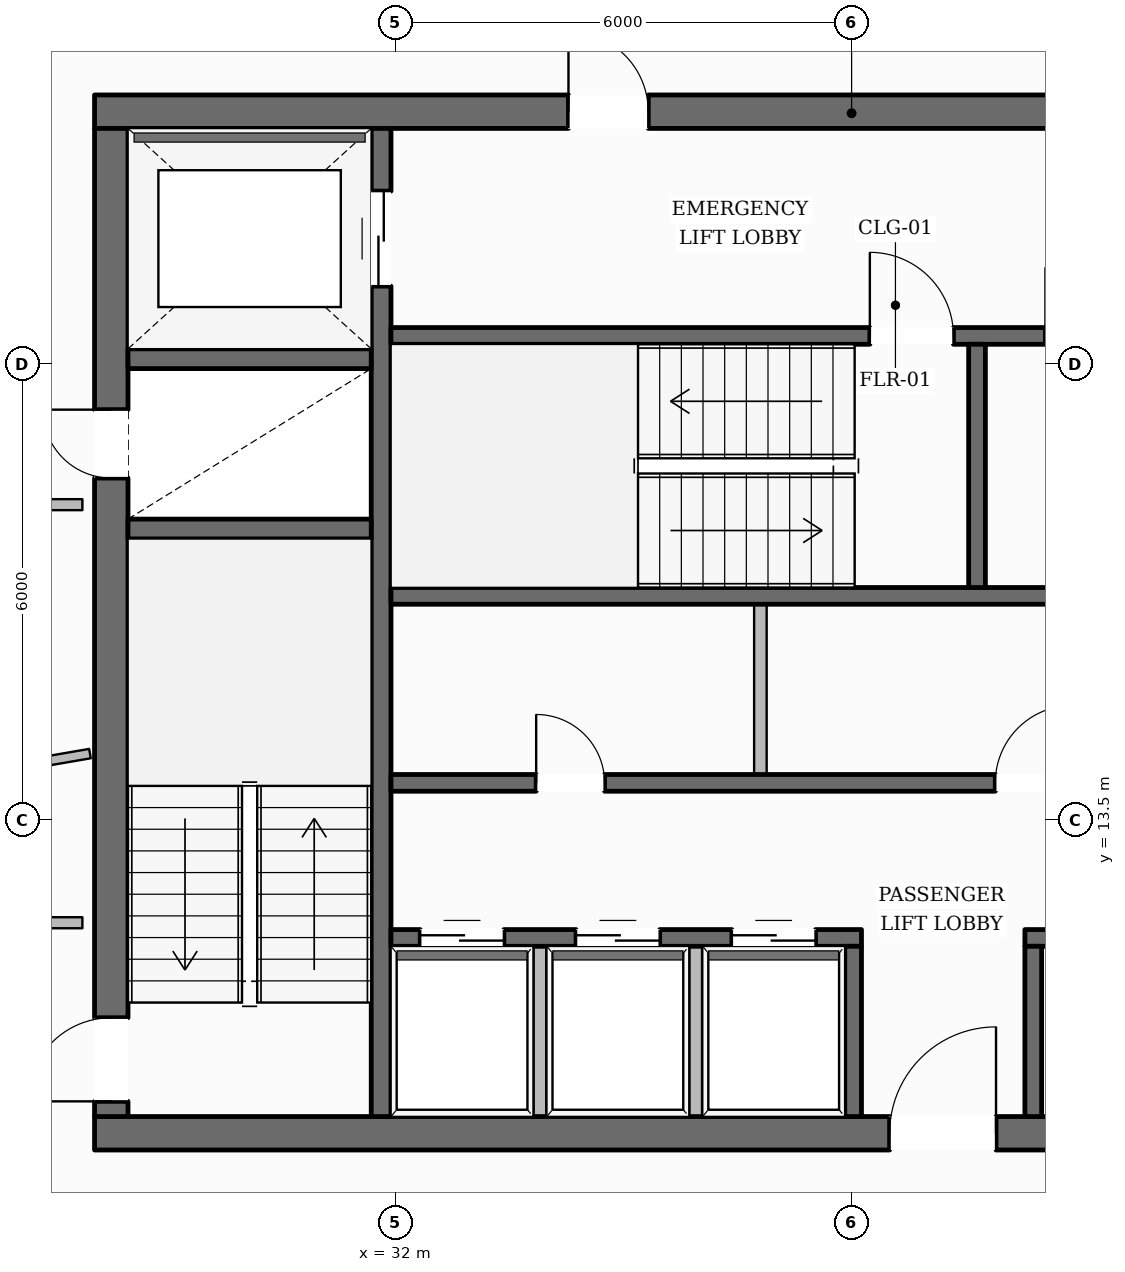
"""IFC4 building model, lengths in metres.
Left out: names, types, materials, properties, quantities, classifications, styles, units other than length and angle.
Written with IfcOpenShell. Run it as: python <this file> out.ifc"""

import sys

from ifc_helpers import new_model, si_unit, direction, frame, frame_2d, origin, place, context, subcontext, project, spatial, rectangle, extrude, element, fill, save


model = new_model("IFC4")
c1 = context("Model", 3, precision=1e-05, world=origin(), true_north=direction((0.0, 1.0)))
c2 = subcontext(c1, "Body", "Model", "MODEL_VIEW")
j1 = project(units=[si_unit("LENGTHUNIT", "METRE"), si_unit("PLANEANGLEUNIT", "RADIAN")], contexts=[c1])
p1 = place(None, origin())
s1 = spatial("IfcSite", under=j1, at=p1, CompositionType="ELEMENT")
p2 = place(p1, origin())
s2 = spatial("IfcBuilding", under=s1, at=p2, CompositionType="ELEMENT")
p3 = place(p2, frame((0.0, 0.0, 180.4)))
s3 = spatial("IfcBuildingStorey", under=s2, at=p3, CompositionType="ELEMENT", Elevation=180.4)
p4 = place(p3, frame((28.04, 9.38, 0.0), z_axis=(0.0, 0.0, 1.0), x_axis=(1.0, 0.0, 0.0)))
e1 = element("IfcWall", 1, at=p4, inside=s3, PredefinedType="SOLIDWALL", context=c2, shape_type="SweptSolid", body=[
    extrude(rectangle(XDim=19.92, YDim=0.44, at=frame_2d((9.96, 0.0))), origin(), (0.0, 0.0, 1.0), 3.6),
])
p5 = place(p4, frame((10.46, 0.0, 0.0)))
e2 = element("IfcOpeningElement", 2, at=p5, cuts=e1, PredefinedType="OPENING", context=c2, shape_type="SweptSolid", body=[
    extrude(rectangle(XDim=1.4, YDim=2.2, at=frame_2d((0.7, 1.1))), frame((0.0, 0.23, 0.0), z_axis=(0.0, -1.0, 0.0), x_axis=(1.0, 0.0, 0.0)), (0.0, 0.0, 1.0), 0.46),
])
p6 = place(p3, frame((28.04, 22.82, 0.0), z_axis=(0.0, 0.0, 1.0), x_axis=(1.0, 0.0, 0.0)))
e3 = element("IfcWall", 3, at=p6, inside=s3, PredefinedType="SOLIDWALL", context=c2, shape_type="SweptSolid", body=[
    extrude(rectangle(XDim=19.92, YDim=0.44, at=frame_2d((9.96, 0.0))), origin(), (0.0, 0.0, 1.0), 3.6),
])
p7 = place(p6, frame((6.235, 0.0, 0.0)))
e4 = element("IfcOpeningElement", 4, at=p7, cuts=e3, PredefinedType="OPENING", context=c2, shape_type="SweptSolid", body=[
    extrude(rectangle(XDim=1.05, YDim=2.15, at=frame_2d((0.525, 1.075))), frame((0.0, 0.23, 0.0), z_axis=(0.0, -1.0, 0.0), x_axis=(1.0, 0.0, 0.0)), (0.0, 0.0, 1.0), 0.46),
])
p8 = place(p6, frame((12.635, 0.0, 0.0)))
e5 = element("IfcOpeningElement", 5, at=p8, cuts=e3, PredefinedType="OPENING", context=c2, shape_type="SweptSolid", body=[
    extrude(rectangle(XDim=1.05, YDim=2.15, at=frame_2d((0.525, 1.075))), frame((0.0, 0.23, 0.0), z_axis=(0.0, -1.0, 0.0), x_axis=(1.0, 0.0, 0.0)), (0.0, 0.0, 1.0), 0.46),
])
p9 = place(p3, frame((28.26, 9.6, 0.0), z_axis=(0.0, 0.0, 1.0), x_axis=(0.0, 1.0, 0.0)))
e6 = element("IfcWall", 6, at=p9, inside=s3, PredefinedType="SOLIDWALL", context=c2, shape_type="SweptSolid", body=[
    extrude(rectangle(XDim=13.0, YDim=0.44, at=frame_2d((6.5, 0.0))), origin(), (0.0, 0.0, 1.0), 3.6),
])
p10 = place(p9, frame((0.2, 0.0, 0.0)))
e7 = element("IfcOpeningElement", 7, at=p10, cuts=e6, PredefinedType="OPENING", context=c2, shape_type="SweptSolid", body=[
    extrude(rectangle(XDim=1.1, YDim=2.15, at=frame_2d((0.55, 1.075))), frame((0.0, 0.23, 0.0), z_axis=(0.0, -1.0, 0.0), x_axis=(1.0, 0.0, 0.0)), (0.0, 0.0, 1.0), 0.46),
])
p11 = place(p9, frame((8.4, 0.0, 0.0)))
e8 = element("IfcOpeningElement", 8, at=p11, cuts=e6, PredefinedType="OPENING", context=c2, shape_type="SweptSolid", body=[
    extrude(rectangle(XDim=0.9, YDim=2.1, at=frame_2d((0.45, 1.05))), frame((0.0, 0.23, 0.0), z_axis=(0.0, -1.0, 0.0), x_axis=(1.0, 0.0, 0.0)), (0.0, 0.0, 1.0), 0.46),
])
p12 = place(p3, frame((31.81, 9.6, 0.0), z_axis=(0.0, 0.0, 1.0), x_axis=(0.0, 1.0, 0.0)))
e9 = element("IfcWall", 9, at=p12, inside=s3, PredefinedType="SHEAR", context=c2, shape_type="SweptSolid", body=[
    extrude(rectangle(XDim=13.0, YDim=0.26, at=frame_2d((6.5, 0.0))), origin(), (0.0, 0.0, 1.0), 3.6),
])
p13 = place(p12, frame((10.925, 0.0, 0.0)))
e10 = element("IfcOpeningElement", 10, at=p13, cuts=e9, PredefinedType="OPENING", context=c2, shape_type="SweptSolid", body=[
    extrude(rectangle(XDim=1.25, YDim=2.25, at=frame_2d((0.625, 1.125))), frame((0.0, 0.14, 0.0), z_axis=(0.0, -1.0, 0.0), x_axis=(1.0, 0.0, 0.0)), (0.0, 0.0, 1.0), 0.28),
])
for number, where, z_axis, x_axis in (
    (11, (28.48, 17.33, 0.0), (0.0, 0.0, 1.0), (1.0, 0.0, 0.0)),
    (12, (28.48, 19.57, 0.0), (0.0, 0.0, 1.0), (1.0, 0.0, 0.0)),
):
    element("IfcWall", number, at=place(p3, frame(where, z_axis=z_axis, x_axis=x_axis)), inside=s3, PredefinedType="SHEAR", context=c2, shape_type="SweptSolid", body=[
        extrude(rectangle(XDim=3.2, YDim=0.26, at=frame_2d((1.6, 0.0))), origin(), (0.0, 0.0, 1.0), 3.6),
    ])
p14 = place(p3, frame((31.94, 19.87, 0.0), z_axis=(0.0, 0.0, 1.0), x_axis=(1.0, 0.0, 0.0)))
e13 = element("IfcWall", 13, at=p14, inside=s3, PredefinedType="SOLIDWALL", context=c2, shape_type="SweptSolid", body=[
    extrude(rectangle(XDim=12.12, YDim=0.22, at=frame_2d((6.06, 0.0))), origin(), (0.0, 0.0, 1.0), 3.6),
])
p15 = place(p14, frame((6.3, 0.0, 0.0)))
e14 = element("IfcOpeningElement", 14, at=p15, cuts=e13, PredefinedType="OPENING", context=c2, shape_type="SweptSolid", body=[
    extrude(rectangle(XDim=1.1, YDim=2.15, at=frame_2d((0.55, 1.075))), frame((0.0, 0.12, 0.0), z_axis=(0.0, -1.0, 0.0), x_axis=(1.0, 0.0, 0.0)), (0.0, 0.0, 1.0), 0.24),
])
p16 = place(p14, frame((8.61, 0.0, 0.0)))
e15 = element("IfcOpeningElement", 15, at=p16, cuts=e13, PredefinedType="OPENING", context=c2, shape_type="SweptSolid", body=[
    extrude(rectangle(XDim=0.9, YDim=2.1, at=frame_2d((0.45, 1.05))), frame((0.0, 0.12, 0.0), z_axis=(0.0, -1.0, 0.0), x_axis=(1.0, 0.0, 0.0)), (0.0, 0.0, 1.0), 0.24),
])
p17 = place(p14, frame((10.85, 0.0, 0.0)))
e16 = element("IfcOpeningElement", 16, at=p17, cuts=e13, PredefinedType="OPENING", context=c2, shape_type="SweptSolid", body=[
    extrude(rectangle(XDim=0.9, YDim=2.1, at=frame_2d((0.45, 1.05))), frame((0.0, 0.12, 0.0), z_axis=(0.0, -1.0, 0.0), x_axis=(1.0, 0.0, 0.0)), (0.0, 0.0, 1.0), 0.24),
])
p18 = place(p3, frame((31.94, 16.45, 0.0), z_axis=(0.0, 0.0, 1.0), x_axis=(1.0, 0.0, 0.0)))
e17 = element("IfcWall", 17, at=p18, inside=s3, PredefinedType="SOLIDWALL", context=c2, shape_type="SweptSolid", body=[
    extrude(rectangle(XDim=12.12, YDim=0.22, at=frame_2d((6.06, 0.0))), origin(), (0.0, 0.0, 1.0), 3.6),
])
p19 = place(p3, frame((39.65, 16.56, 0.0), z_axis=(0.0, 0.0, 1.0), x_axis=(0.0, 1.0, 0.0)))
e18 = element("IfcWall", 18, at=p19, inside=s3, PredefinedType="SOLIDWALL", context=c2, shape_type="SweptSolid", body=[
    extrude(rectangle(XDim=3.2, YDim=0.22, at=frame_2d((1.6, 0.0))), origin(), (0.0, 0.0, 1.0), 3.6),
])
p20 = place(p3, frame((31.94, 13.99, 0.0), z_axis=(0.0, 0.0, 1.0), x_axis=(1.0, 0.0, 0.0)))
e19 = element("IfcWall", 19, at=p20, inside=s3, PredefinedType="SOLIDWALL", context=c2, shape_type="SweptSolid", body=[
    extrude(rectangle(XDim=12.12, YDim=0.22, at=frame_2d((6.06, 0.0))), origin(), (0.0, 0.0, 1.0), 3.6),
])
p21 = place(p20, frame((1.91, 0.0, 0.0)))
e20 = element("IfcOpeningElement", 20, at=p21, cuts=e19, PredefinedType="OPENING", context=c2, shape_type="SweptSolid", body=[
    extrude(rectangle(XDim=0.9, YDim=2.1, at=frame_2d((0.45, 1.05))), frame((0.0, 0.12, 0.0), z_axis=(0.0, -1.0, 0.0), x_axis=(1.0, 0.0, 0.0)), (0.0, 0.0, 1.0), 0.24),
])
p22 = place(p20, frame((7.95, 0.0, 0.0)))
e21 = element("IfcOpeningElement", 21, at=p22, cuts=e19, PredefinedType="OPENING", context=c2, shape_type="SweptSolid", body=[
    extrude(rectangle(XDim=1.02, YDim=2.15, at=frame_2d((0.51, 1.075))), frame((0.0, 0.12, 0.0), z_axis=(0.0, -1.0, 0.0), x_axis=(1.0, 0.0, 0.0)), (0.0, 0.0, 1.0), 0.24),
])
p23 = place(p3, frame((31.94, 11.95, 0.0), z_axis=(0.0, 0.0, 1.0), x_axis=(1.0, 0.0, 0.0)))
e22 = element("IfcWall", 22, at=p23, inside=s3, PredefinedType="SOLIDWALL", context=c2, shape_type="SweptSolid", body=[
    extrude(rectangle(XDim=6.19, YDim=0.22, at=frame_2d((3.095, 0.0))), origin(), (0.0, 0.0, 1.0), 3.6),
])
p24 = place(p23, frame((0.385, 0.0, 0.0)))
e23 = element("IfcOpeningElement", 23, at=p24, cuts=e22, PredefinedType="OPENING", context=c2, shape_type="SweptSolid", body=[
    extrude(rectangle(XDim=1.1, YDim=2.2, at=frame_2d((0.55, 1.1))), frame((0.0, 0.12, 0.0), z_axis=(0.0, -1.0, 0.0), x_axis=(1.0, 0.0, 0.0)), (0.0, 0.0, 1.0), 0.24),
])
p25 = place(p23, frame((2.435, 0.0, 0.0)))
e24 = element("IfcOpeningElement", 24, at=p25, cuts=e22, PredefinedType="OPENING", context=c2, shape_type="SweptSolid", body=[
    extrude(rectangle(XDim=1.1, YDim=2.2, at=frame_2d((0.55, 1.1))), frame((0.0, 0.12, 0.0), z_axis=(0.0, -1.0, 0.0), x_axis=(1.0, 0.0, 0.0)), (0.0, 0.0, 1.0), 0.24),
])
p26 = place(p23, frame((4.485, 0.0, 0.0)))
e25 = element("IfcOpeningElement", 25, at=p26, cuts=e22, PredefinedType="OPENING", context=c2, shape_type="SweptSolid", body=[
    extrude(rectangle(XDim=1.1, YDim=2.2, at=frame_2d((0.55, 1.1))), frame((0.0, 0.12, 0.0), z_axis=(0.0, -1.0, 0.0), x_axis=(1.0, 0.0, 0.0)), (0.0, 0.0, 1.0), 0.24),
])
p27 = place(p3, frame((40.28, 11.95, 0.0), z_axis=(0.0, 0.0, 1.0), x_axis=(1.0, 0.0, 0.0)))
e26 = element("IfcWall", 26, at=p27, inside=s3, PredefinedType="SOLIDWALL", context=c2, shape_type="SweptSolid", body=[
    extrude(rectangle(XDim=3.78, YDim=0.22, at=frame_2d((1.89, 0.0))), origin(), (0.0, 0.0, 1.0), 3.6),
])
p28 = place(p27, frame((1.55, 0.0, 0.0)))
e27 = element("IfcOpeningElement", 27, at=p28, cuts=e26, PredefinedType="OPENING", context=c2, shape_type="SweptSolid", body=[
    extrude(rectangle(XDim=0.9, YDim=2.1, at=frame_2d((0.45, 1.05))), frame((0.0, 0.12, 0.0), z_axis=(0.0, -1.0, 0.0), x_axis=(1.0, 0.0, 0.0)), (0.0, 0.0, 1.0), 0.24),
])
for number, where, z_axis, x_axis in (
    (28, (38.02, 9.6, 0.0), (0.0, 0.0, 1.0), (0.0, 1.0, 0.0)),
    (29, (40.39, 9.6, 0.0), (0.0, 0.0, 1.0), (0.0, 1.0, 0.0)),
):
    element("IfcWall", number, at=place(p3, frame(where, z_axis=z_axis, x_axis=x_axis)), inside=s3, PredefinedType="SOLIDWALL", context=c2, shape_type="SweptSolid", body=[
        extrude(rectangle(XDim=2.24, YDim=0.22, at=frame_2d((1.12, 0.0))), origin(), (0.0, 0.0, 1.0), 3.6),
    ])
p29 = place(p3, frame((15.064, 11.953, 0.0), z_axis=(0.0, 0.0, 1.0), x_axis=(0.495993114815, 0.86832645362, 0.0)))
e30 = element("IfcWall", 30, at=p29, inside=s3, PredefinedType="STANDARD", context=c2, shape_type="SweptSolid", body=[
    extrude(rectangle(XDim=37.324, YDim=0.35, at=frame_2d((18.662, 0.0))), origin(), (0.0, 0.0, 1.0), 3.132),
])
p30 = place(p29, frame((33.087, 0.0, 0.65)))
e31 = element("IfcOpeningElement", 31, at=p30, cuts=e30, PredefinedType="OPENING", context=c2, shape_type="SweptSolid", body=[
    extrude(rectangle(XDim=1.45, YDim=1.75, at=frame_2d((0.725, 0.875))), frame((0.0, 0.185, 0.0), z_axis=(0.0, -1.0, 0.0), x_axis=(1.0, 0.0, 0.0)), (0.0, 0.0, 1.0), 0.37),
])
p31 = place(p29, frame((27.026, 0.0, 0.65)))
e32 = element("IfcOpeningElement", 32, at=p31, cuts=e30, PredefinedType="OPENING", context=c2, shape_type="SweptSolid", body=[
    extrude(rectangle(XDim=1.45, YDim=1.75, at=frame_2d((0.725, 0.875))), frame((0.0, 0.185, 0.0), z_axis=(0.0, -1.0, 0.0), x_axis=(1.0, 0.0, 0.0)), (0.0, 0.0, 1.0), 0.37),
])
p32 = place(p29, frame((14.904, 0.0, 0.65)))
e33 = element("IfcOpeningElement", 33, at=p32, cuts=e30, PredefinedType="OPENING", context=c2, shape_type="SweptSolid", body=[
    extrude(rectangle(XDim=1.45, YDim=1.75, at=frame_2d((0.725, 0.875))), frame((0.0, 0.185, 0.0), z_axis=(0.0, -1.0, 0.0), x_axis=(1.0, 0.0, 0.0)), (0.0, 0.0, 1.0), 0.37),
])
p33 = place(p29, frame((8.844, 0.0, 0.65)))
e34 = element("IfcOpeningElement", 34, at=p33, cuts=e30, PredefinedType="OPENING", context=c2, shape_type="SweptSolid", body=[
    extrude(rectangle(XDim=1.45, YDim=1.75, at=frame_2d((0.725, 0.875))), frame((0.0, 0.185, 0.0), z_axis=(0.0, -1.0, 0.0), x_axis=(1.0, 0.0, 0.0)), (0.0, 0.0, 1.0), 0.37),
])
p34 = place(p29, frame((2.782, 0.0, 0.65)))
e35 = element("IfcOpeningElement", 35, at=p34, cuts=e30, PredefinedType="OPENING", context=c2, shape_type="SweptSolid", body=[
    extrude(rectangle(XDim=1.45, YDim=1.75, at=frame_2d((0.725, 0.875))), frame((0.0, 0.185, 0.0), z_axis=(0.0, -1.0, 0.0), x_axis=(1.0, 0.0, 0.0)), (0.0, 0.0, 1.0), 0.37),
])
for number, where, z_axis, x_axis in (
    (36, (33.9, 9.52, 0.0), (0.0, 0.0, 1.0), (0.0, 1.0, 0.0)),
    (37, (35.95, 9.52, 0.0), (0.0, 0.0, 1.0), (0.0, 1.0, 0.0)),
):
    element("IfcWall", number, at=place(p3, frame(where, z_axis=z_axis, x_axis=x_axis)), inside=s3, PredefinedType="PARTITIONING", context=c2, shape_type="SweptSolid", body=[
        extrude(rectangle(XDim=2.32, YDim=0.165, at=frame_2d((1.16, 0.0))), origin(), (0.0, 0.0, 1.0), 3.6),
    ])
p35 = place(p3, frame((36.8, 14.1, 0.0), z_axis=(0.0, 0.0, 1.0), x_axis=(0.0, 1.0, 0.0)))
e38 = element("IfcWall", 38, at=p35, inside=s3, PredefinedType="PARTITIONING", context=c2, shape_type="SweptSolid", body=[
    extrude(rectangle(XDim=2.24, YDim=0.165, at=frame_2d((1.12, 0.0))), origin(), (0.0, 0.0, 1.0), 3.6),
])
for number, where, z_axis, x_axis in (
    (39, (27.88, 17.65, 0.0), (0.0, 0.0, 1.0), (-1.0, 0.0, 0.0)),
    (40, (26.06, 12.15, 0.0), (0.0, 0.0, 1.0), (1.0, 0.0, 0.0)),
):
    element("IfcWall", number, at=place(p3, frame(where, z_axis=z_axis, x_axis=x_axis)), inside=s3, PredefinedType="PARTITIONING", context=c2, shape_type="SweptSolid", body=[
        extrude(rectangle(XDim=1.82, YDim=0.145, at=frame_2d((0.91, 0.0))), origin(), (0.0, 0.0, 1.0), 3.141),
    ])
p36 = place(p3, frame((27.98, 14.375, 0.0), z_axis=(0.0, 0.0, 1.0), x_axis=(-0.9855033492, -0.169655971646, 0.0)))
e41 = element("IfcWall", 41, at=p36, inside=s3, PredefinedType="PARTITIONING", context=c2, shape_type="SweptSolid", body=[
    extrude(rectangle(XDim=12.315, YDim=0.125, at=frame_2d((6.158, 0.0))), origin(), (0.0, 0.0, 1.0), 3.141),
])
p37 = place(p10, origin())
e42 = element("IfcDoor", 42, at=p37, inside=s3, OperationType="SINGLE_SWING_LEFT", PredefinedType="DOOR", context=c2, shape_type="SweptSolid", body=[
    extrude(rectangle(XDim=1.1, YDim=2.15, at=frame_2d((0.55, 1.075))), frame((0.0, 0.025, 0.0), z_axis=(0.0, -1.0, 0.0), x_axis=(1.0, 0.0, 0.0)), (0.0, 0.0, 1.0), 0.05),
])
fill(e7, e42)
p38 = place(p15, origin())
e43 = element("IfcDoor", 43, at=p38, inside=s3, OperationType="SINGLE_SWING_LEFT", PredefinedType="DOOR", context=c2, shape_type="SweptSolid", body=[
    extrude(rectangle(XDim=1.1, YDim=2.15, at=frame_2d((0.55, 1.075))), frame((0.0, 0.025, 0.0), z_axis=(0.0, -1.0, 0.0), x_axis=(1.0, 0.0, 0.0)), (0.0, 0.0, 1.0), 0.05),
])
fill(e14, e43)
p39 = place(p11, origin())
e44 = element("IfcDoor", 44, at=p39, inside=s3, OperationType="SINGLE_SWING_RIGHT", PredefinedType="DOOR", context=c2, shape_type="SweptSolid", body=[
    extrude(rectangle(XDim=0.9, YDim=2.1, at=frame_2d((0.45, 1.05))), frame((0.0, 0.025, 0.0), z_axis=(0.0, -1.0, 0.0), x_axis=(1.0, 0.0, 0.0)), (0.0, 0.0, 1.0), 0.05),
])
fill(e8, e44)
p40 = place(p7, origin())
e45 = element("IfcDoor", 45, at=p40, inside=s3, OperationType="SINGLE_SWING_LEFT", PredefinedType="DOOR", context=c2, shape_type="SweptSolid", body=[
    extrude(rectangle(XDim=1.05, YDim=2.15, at=frame_2d((0.525, 1.075))), frame((0.0, 0.025, 0.0), z_axis=(0.0, -1.0, 0.0), x_axis=(1.0, 0.0, 0.0)), (0.0, 0.0, 1.0), 0.05),
])
fill(e4, e45)
p41 = place(p13, origin())
e46 = element("IfcDoor", 46, at=p41, inside=s3, OperationType="DOUBLE_DOOR_SLIDING", PredefinedType="DOOR", context=c2, shape_type="SweptSolid", body=[
    extrude(rectangle(XDim=1.25, YDim=2.25, at=frame_2d((0.625, 1.125))), frame((0.0, 0.025, 0.0), z_axis=(0.0, -1.0, 0.0), x_axis=(1.0, 0.0, 0.0)), (0.0, 0.0, 1.0), 0.05),
])
fill(e10, e46)
p42 = place(p5, origin())
e47 = element("IfcDoor", 47, at=p42, inside=s3, OperationType="SINGLE_SWING_RIGHT", PredefinedType="DOOR", context=c2, shape_type="SweptSolid", body=[
    extrude(rectangle(XDim=1.4, YDim=2.2, at=frame_2d((0.7, 1.1))), frame((0.0, 0.025, 0.0), z_axis=(0.0, -1.0, 0.0), x_axis=(1.0, 0.0, 0.0)), (0.0, 0.0, 1.0), 0.05),
])
fill(e2, e47)
p43 = place(p24, origin())
e48 = element("IfcDoor", 48, at=p43, inside=s3, OperationType="DOUBLE_DOOR_SLIDING", PredefinedType="DOOR", context=c2, shape_type="SweptSolid", body=[
    extrude(rectangle(XDim=1.1, YDim=2.2, at=frame_2d((0.55, 1.1))), frame((0.0, 0.025, 0.0), z_axis=(0.0, -1.0, 0.0), x_axis=(1.0, 0.0, 0.0)), (0.0, 0.0, 1.0), 0.05),
])
fill(e23, e48)
p44 = place(p25, origin())
e49 = element("IfcDoor", 49, at=p44, inside=s3, OperationType="DOUBLE_DOOR_SLIDING", PredefinedType="DOOR", context=c2, shape_type="SweptSolid", body=[
    extrude(rectangle(XDim=1.1, YDim=2.2, at=frame_2d((0.55, 1.1))), frame((0.0, 0.025, 0.0), z_axis=(0.0, -1.0, 0.0), x_axis=(1.0, 0.0, 0.0)), (0.0, 0.0, 1.0), 0.05),
])
fill(e24, e49)
p45 = place(p26, origin())
e50 = element("IfcDoor", 50, at=p45, inside=s3, OperationType="DOUBLE_DOOR_SLIDING", PredefinedType="DOOR", context=c2, shape_type="SweptSolid", body=[
    extrude(rectangle(XDim=1.1, YDim=2.2, at=frame_2d((0.55, 1.1))), frame((0.0, 0.025, 0.0), z_axis=(0.0, -1.0, 0.0), x_axis=(1.0, 0.0, 0.0)), (0.0, 0.0, 1.0), 0.05),
])
fill(e25, e50)
p46 = place(p21, origin())
e51 = element("IfcDoor", 51, at=p46, inside=s3, OperationType="SINGLE_SWING_LEFT", PredefinedType="DOOR", context=c2, shape_type="SweptSolid", body=[
    extrude(rectangle(XDim=0.9, YDim=2.1, at=frame_2d((0.45, 1.05))), frame((0.0, 0.025, 0.0), z_axis=(0.0, -1.0, 0.0), x_axis=(1.0, 0.0, 0.0)), (0.0, 0.0, 1.0), 0.05),
])
fill(e20, e51)
p47 = place(p22, origin())
e52 = element("IfcDoor", 52, at=p47, inside=s3, OperationType="SINGLE_SWING_RIGHT", PredefinedType="DOOR", context=c2, shape_type="SweptSolid", body=[
    extrude(rectangle(XDim=1.02, YDim=2.15, at=frame_2d((0.51, 1.075))), frame((0.0, 0.025, 0.0), z_axis=(0.0, -1.0, 0.0), x_axis=(1.0, 0.0, 0.0)), (0.0, 0.0, 1.0), 0.05),
])
fill(e21, e52)
save(model, sys.argv[1])
